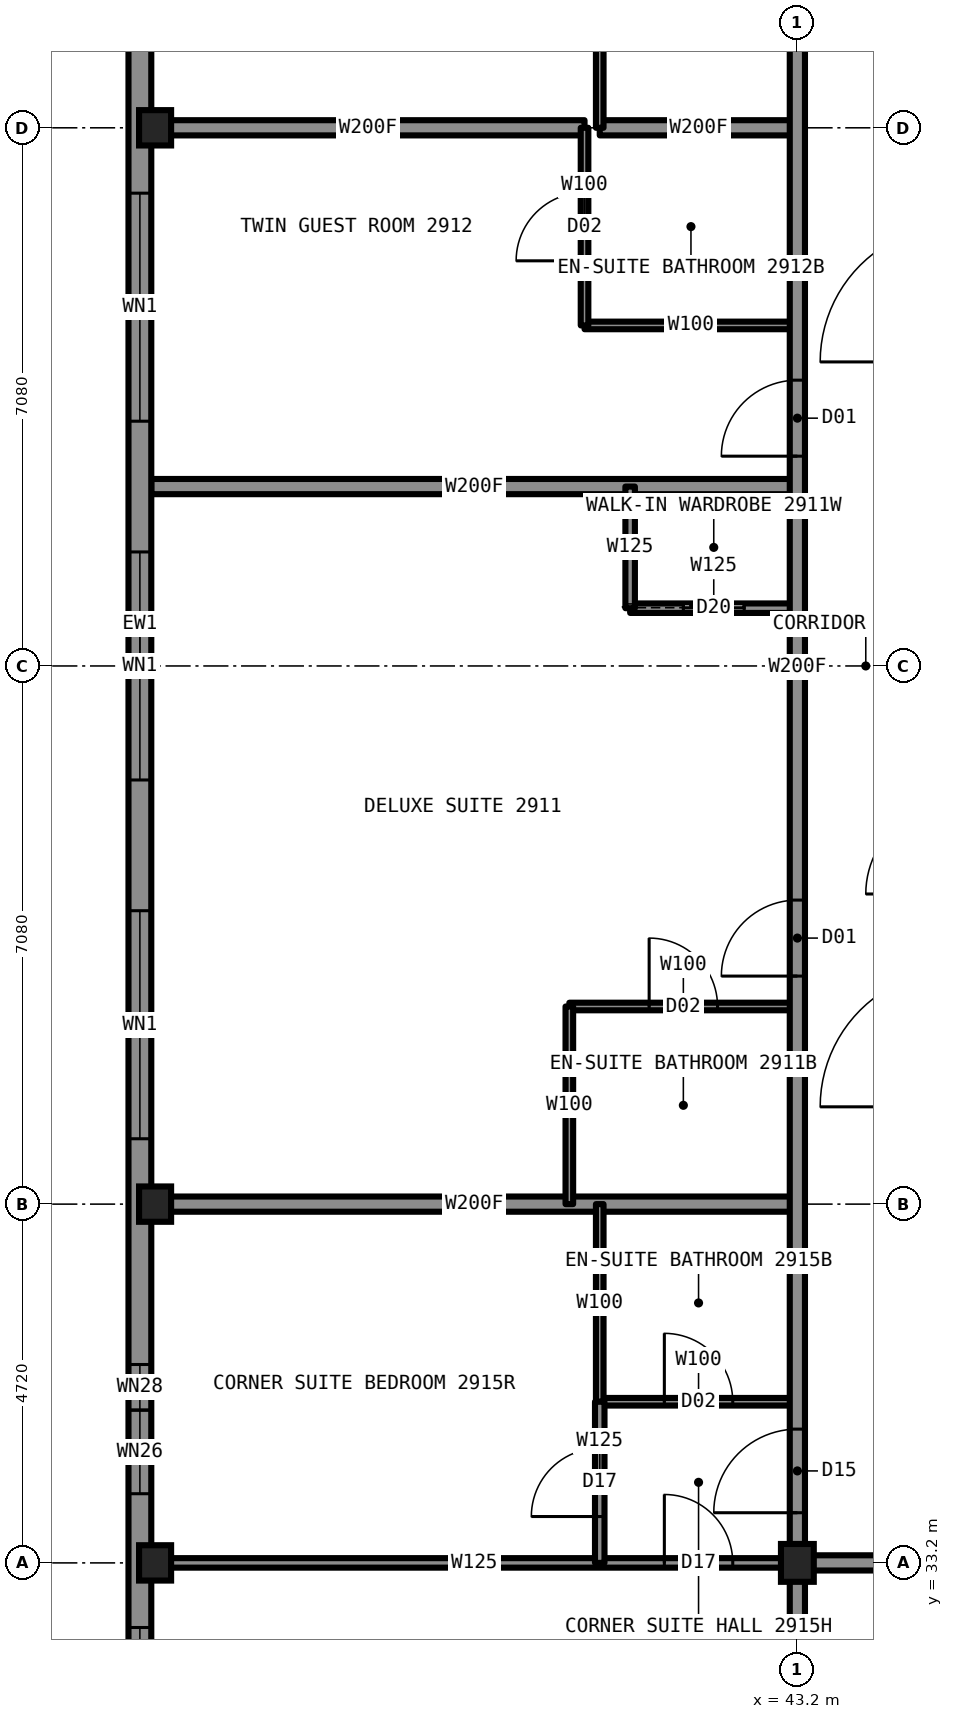
"""IFC4 building model, lengths in metres.
Left out: names, types, materials, properties, quantities, classifications, styles, units other than length and angle.
Written with IfcOpenShell. Run it as: python <this file> out.ifc"""

import sys

from ifc_helpers import new_model, si_unit, direction, frame, frame_2d, origin, origin_2d, place, context, subcontext, project, spatial, rectangle, i_section, extrude, element, fill, save


model = new_model("IFC4")
c1 = context("Model", 3, precision=1e-05, world=origin(), true_north=direction((0.0, 1.0)))
c2 = subcontext(c1, "Body", "Model", "MODEL_VIEW")
j1 = project(units=[si_unit("LENGTHUNIT", "METRE"), si_unit("PLANEANGLEUNIT", "RADIAN")], contexts=[c1])
p1 = place(None, origin())
s1 = spatial("IfcSite", under=j1, at=p1, CompositionType="ELEMENT")
p2 = place(p1, origin())
s2 = spatial("IfcBuilding", under=s1, at=p2, CompositionType="ELEMENT")
p3 = place(p2, frame((0.0, 0.0, 103.9)))
s3 = spatial("IfcBuildingStorey", under=s2, at=p3, CompositionType="ELEMENT", Elevation=103.9)
for number, where, z_axis, x_axis in (
    (1, (34.75, 33.2, 0.0), (0.0, 0.0, 1.0), (1.0, 0.0, 0.0)),
    (2, (34.75, 37.92, 0.0), (0.0, 0.0, 1.0), (1.0, 0.0, 0.0)),
    (3, (34.75, 52.08, 0.0), (0.0, 0.0, 1.0), (1.0, 0.0, 0.0)),
):
    element("IfcColumn", number, at=place(p3, frame(where, z_axis=z_axis, x_axis=x_axis)), inside=s3, PredefinedType="COLUMN", context=c2, shape_type="SweptSolid", body=[
        extrude(i_section(OverallWidth=0.422, OverallDepth=0.465, WebThickness=0.045, FlangeThickness=0.073, at=origin_2d()), origin(), (0.0, 0.0, 1.0), 3.5),
    ])
p4 = place(p3, frame((43.2, 33.2, 0.0), z_axis=(0.0, 0.0, 1.0), x_axis=(1.0, 0.0, 0.0)))
e4 = element("IfcColumn", 4, at=p4, inside=s3, PredefinedType="COLUMN", context=c2, shape_type="SweptSolid", body=[
    extrude(i_section(OverallWidth=0.432, OverallDepth=0.498, WebThickness=0.056, FlangeThickness=0.089, at=origin_2d()), origin(), (0.0, 0.0, 1.0), 3.5),
])
p5 = place(p3, frame((43.2, 33.2, 0.0), z_axis=(0.0, 0.0, 1.0), x_axis=(1.0, 0.0, 0.0)))
e5 = element("IfcWall", 5, at=p5, inside=s3, PredefinedType="PARTITIONING", context=c2, shape_type="SweptSolid", body=[
    extrude(rectangle(XDim=23.6, YDim=0.2, at=frame_2d((11.8, 0.0))), origin(), (0.0, 0.0, 1.0), 3.33),
])
p6 = place(p5, frame((3.0, 0.0, 0.0)))
e6 = element("IfcOpeningElement", 6, at=p6, cuts=e5, PredefinedType="OPENING", context=c2, shape_type="SweptSolid", body=[
    extrude(rectangle(XDim=1.0, YDim=2.2, at=frame_2d((0.5, 1.1))), frame((0.0, 0.11, 0.0), z_axis=(0.0, -1.0, 0.0), x_axis=(1.0, 0.0, 0.0)), (0.0, 0.0, 1.0), 0.22),
])
p7 = place(p5, frame((12.44, 0.0, 0.0)))
e7 = element("IfcOpeningElement", 7, at=p7, cuts=e5, PredefinedType="OPENING", context=c2, shape_type="SweptSolid", body=[
    extrude(rectangle(XDim=1.0, YDim=2.2, at=frame_2d((0.5, 1.1))), frame((0.0, 0.11, 0.0), z_axis=(0.0, -1.0, 0.0), x_axis=(1.0, 0.0, 0.0)), (0.0, 0.0, 1.0), 0.22),
])
p8 = place(p5, frame((21.43, 0.0, 0.0)))
e8 = element("IfcOpeningElement", 8, at=p8, cuts=e5, PredefinedType="OPENING", context=c2, shape_type="SweptSolid", body=[
    extrude(rectangle(XDim=1.0, YDim=2.2, at=frame_2d((0.5, 1.1))), frame((0.0, 0.11, 0.0), z_axis=(0.0, -1.0, 0.0), x_axis=(1.0, 0.0, 0.0)), (0.0, 0.0, 1.0), 0.22),
])
p9 = place(p3, frame((34.7, 33.2, 0.0), z_axis=(0.0, 0.0, 1.0), x_axis=(1.0, 0.0, 0.0)))
e9 = element("IfcWall", 9, at=p9, inside=s3, PredefinedType="PARTITIONING", context=c2, shape_type="SweptSolid", body=[
    extrude(rectangle(XDim=8.5, YDim=0.125, at=frame_2d((4.25, 0.0))), origin(), (0.0, 0.0, 1.0), 2.573),
])
p10 = place(p9, frame((6.75, 0.0, 0.0)))
e10 = element("IfcOpeningElement", 10, at=p10, cuts=e9, PredefinedType="OPENING", context=c2, shape_type="SweptSolid", body=[
    extrude(rectangle(XDim=0.9, YDim=2.2, at=frame_2d((0.45, 1.1))), frame((0.0, 0.073, 0.0), z_axis=(0.0, -1.0, 0.0), x_axis=(1.0, 0.0, 0.0)), (0.0, 0.0, 1.0), 0.145),
])
p11 = place(p3, frame((40.2, 40.52, 0.0), z_axis=(0.0, 0.0, 1.0), x_axis=(1.0, 0.0, 0.0)))
e11 = element("IfcWall", 11, at=p11, inside=s3, PredefinedType="PARTITIONING", context=c2, shape_type="SweptSolid", body=[
    extrude(rectangle(XDim=3.0, YDim=0.1, at=frame_2d((1.5, 0.0))), origin(), (0.0, 0.0, 1.0), 3.33),
])
p12 = place(p11, frame((1.05, 0.0, 0.0)))
e12 = element("IfcOpeningElement", 12, at=p12, cuts=e11, PredefinedType="OPENING", context=c2, shape_type="SweptSolid", body=[
    extrude(rectangle(XDim=0.9, YDim=2.1, at=frame_2d((0.45, 1.05))), frame((0.0, 0.06, 0.0), z_axis=(0.0, -1.0, 0.0), x_axis=(1.0, 0.0, 0.0)), (0.0, 0.0, 1.0), 0.12),
])
p13 = place(p3, frame((34.7, 37.92, 0.0), z_axis=(0.0, 0.0, 1.0), x_axis=(1.0, 0.0, 0.0)))
e13 = element("IfcWall", 13, at=p13, inside=s3, PredefinedType="PARTITIONING", context=c2, shape_type="SweptSolid", body=[
    extrude(rectangle(XDim=8.5, YDim=0.2, at=frame_2d((4.25, 0.0))), origin(), (0.0, 0.0, 1.0), 2.573),
])
p14 = place(p3, frame((40.6, 35.32, 0.0), z_axis=(0.0, 0.0, 1.0), x_axis=(1.0, 0.0, 0.0)))
e14 = element("IfcWall", 14, at=p14, inside=s3, PredefinedType="PARTITIONING", context=c2, shape_type="SweptSolid", body=[
    extrude(rectangle(XDim=2.6, YDim=0.1, at=frame_2d((1.3, 0.0))), origin(), (0.0, 0.0, 1.0), 3.33),
])
p15 = place(p14, frame((0.85, 0.0, 0.0)))
e15 = element("IfcOpeningElement", 15, at=p15, cuts=e14, PredefinedType="OPENING", context=c2, shape_type="SweptSolid", body=[
    extrude(rectangle(XDim=0.9, YDim=2.1, at=frame_2d((0.45, 1.05))), frame((0.0, 0.06, 0.0), z_axis=(0.0, -1.0, 0.0), x_axis=(1.0, 0.0, 0.0)), (0.0, 0.0, 1.0), 0.12),
])
p16 = place(p3, frame((41.0, 45.76, 0.0), z_axis=(0.0, 0.0, 1.0), x_axis=(1.0, 0.0, 0.0)))
e16 = element("IfcWall", 16, at=p16, inside=s3, PredefinedType="PARTITIONING", context=c2, shape_type="SweptSolid", body=[
    extrude(rectangle(XDim=2.2, YDim=0.125, at=frame_2d((1.1, 0.0))), origin(), (0.0, 0.0, 1.0), 3.33),
])
p17 = place(p16, frame((0.7, 0.0, 0.0)))
e17 = element("IfcOpeningElement", 17, at=p17, cuts=e16, PredefinedType="OPENING", context=c2, shape_type="SweptSolid", body=[
    extrude(rectangle(XDim=0.8, YDim=2.1, at=frame_2d((0.4, 1.05))), frame((0.0, 0.073, 0.0), z_axis=(0.0, -1.0, 0.0), x_axis=(1.0, 0.0, 0.0)), (0.0, 0.0, 1.0), 0.145),
])
p18 = place(p3, frame((34.7, 47.36, 0.0), z_axis=(0.0, 0.0, 1.0), x_axis=(1.0, 0.0, 0.0)))
e18 = element("IfcWall", 18, at=p18, inside=s3, PredefinedType="PARTITIONING", context=c2, shape_type="SweptSolid", body=[
    extrude(rectangle(XDim=8.5, YDim=0.2, at=frame_2d((4.25, 0.0))), origin(), (0.0, 0.0, 1.0), 2.731),
])
p19 = place(p3, frame((40.4, 49.48, 0.0), z_axis=(0.0, 0.0, 1.0), x_axis=(1.0, 0.0, 0.0)))
e19 = element("IfcWall", 19, at=p19, inside=s3, PredefinedType="PARTITIONING", context=c2, shape_type="SweptSolid", body=[
    extrude(rectangle(XDim=2.8, YDim=0.1, at=frame_2d((1.4, 0.0))), origin(), (0.0, 0.0, 1.0), 3.33),
])
p20 = place(p3, frame((34.7, 52.08, 0.0), z_axis=(0.0, 0.0, 1.0), x_axis=(1.0, 0.0, 0.0)))
e20 = element("IfcWall", 20, at=p20, inside=s3, PredefinedType="PARTITIONING", context=c2, shape_type="SweptSolid", body=[
    extrude(rectangle(XDim=5.7, YDim=0.2, at=frame_2d((2.85, 0.0))), origin(), (0.0, 0.0, 1.0), 2.573),
])
p21 = place(p3, frame((40.6, 52.08, 0.0), z_axis=(0.0, 0.0, 1.0), x_axis=(1.0, 0.0, 0.0)))
e21 = element("IfcWall", 21, at=p21, inside=s3, PredefinedType="PARTITIONING", context=c2, shape_type="SweptSolid", body=[
    extrude(rectangle(XDim=2.6, YDim=0.2, at=frame_2d((1.3, 0.0))), origin(), (0.0, 0.0, 1.0), 2.573),
])
p22 = place(p3, frame((43.2, 33.2, 0.0), z_axis=(0.0, 0.0, 1.0), x_axis=(0.0, 1.0, 0.0)))
e22 = element("IfcWall", 22, at=p22, inside=s3, PredefinedType="PARTITIONING", context=c2, shape_type="SweptSolid", body=[
    extrude(rectangle(XDim=23.58, YDim=0.2, at=frame_2d((11.79, 0.0))), origin(), (0.0, 0.0, 1.0), 3.33),
])
p23 = place(p22, frame((7.72, 0.0, 0.0)))
e23 = element("IfcOpeningElement", 23, at=p23, cuts=e22, PredefinedType="OPENING", context=c2, shape_type="SweptSolid", body=[
    extrude(rectangle(XDim=1.0, YDim=2.2, at=frame_2d((0.5, 1.1))), frame((0.0, 0.11, 0.0), z_axis=(0.0, -1.0, 0.0), x_axis=(1.0, 0.0, 0.0)), (0.0, 0.0, 1.0), 0.22),
])
p24 = place(p22, frame((14.56, 0.0, 0.0)))
e24 = element("IfcOpeningElement", 24, at=p24, cuts=e22, PredefinedType="OPENING", context=c2, shape_type="SweptSolid", body=[
    extrude(rectangle(XDim=1.0, YDim=2.2, at=frame_2d((0.5, 1.1))), frame((0.0, 0.11, 0.0), z_axis=(0.0, -1.0, 0.0), x_axis=(1.0, 0.0, 0.0)), (0.0, 0.0, 1.0), 0.22),
])
p25 = place(p22, frame((21.84, 0.0, 0.0)))
e25 = element("IfcOpeningElement", 25, at=p25, cuts=e22, PredefinedType="OPENING", context=c2, shape_type="SweptSolid", body=[
    extrude(rectangle(XDim=1.1, YDim=2.2, at=frame_2d((0.55, 1.1))), frame((0.0, 0.11, 0.0), z_axis=(0.0, -1.0, 0.0), x_axis=(1.0, 0.0, 0.0)), (0.0, 0.0, 1.0), 0.22),
])
p26 = place(p22, frame((0.66, 0.0, 0.0)))
e26 = element("IfcOpeningElement", 26, at=p26, cuts=e22, PredefinedType="OPENING", context=c2, shape_type="SweptSolid", body=[
    extrude(rectangle(XDim=1.1, YDim=2.2, at=frame_2d((0.55, 1.1))), frame((0.0, 0.11, 0.0), z_axis=(0.0, -1.0, 0.0), x_axis=(1.0, 0.0, 0.0)), (0.0, 0.0, 1.0), 0.22),
])
p27 = place(p3, frame((43.2, 24.7, 0.0), z_axis=(0.0, 0.0, 1.0), x_axis=(0.0, 1.0, 0.0)))
e27 = element("IfcWall", 27, at=p27, inside=s3, PredefinedType="PARTITIONING", context=c2, shape_type="SweptSolid", body=[
    extrude(rectangle(XDim=8.5, YDim=0.2, at=frame_2d((4.25, 0.0))), origin(), (0.0, 0.0, 1.0), 2.573),
])
p28 = place(p3, frame((41.0, 45.76, 0.0), z_axis=(0.0, 0.0, 1.0), x_axis=(0.0, 1.0, 0.0)))
e28 = element("IfcWall", 28, at=p28, inside=s3, PredefinedType="PARTITIONING", context=c2, shape_type="SweptSolid", body=[
    extrude(rectangle(XDim=1.6, YDim=0.125, at=frame_2d((0.8, 0.0))), origin(), (0.0, 0.0, 1.0), 3.33),
])
for number, where, z_axis, x_axis in (
    (29, (40.6, 35.32, 0.0), (0.0, 0.0, 1.0), (0.0, 1.0, 0.0)),
    (30, (40.6, 52.08, 0.0), (0.0, 0.0, 1.0), (0.0, 1.0, 0.0)),
):
    element("IfcWall", number, at=place(p3, frame(where, z_axis=z_axis, x_axis=x_axis)), inside=s3, PredefinedType="PARTITIONING", context=c2, shape_type="SweptSolid", body=[
        extrude(rectangle(XDim=2.6, YDim=0.1, at=frame_2d((1.3, 0.0))), origin(), (0.0, 0.0, 1.0), 3.33),
    ])
p29 = place(p3, frame((40.6, 33.2, 0.0), z_axis=(0.0, 0.0, 1.0), x_axis=(0.0, 1.0, 0.0)))
e31 = element("IfcWall", 31, at=p29, inside=s3, PredefinedType="PARTITIONING", context=c2, shape_type="SweptSolid", body=[
    extrude(rectangle(XDim=2.12, YDim=0.125, at=frame_2d((1.06, 0.0))), origin(), (0.0, 0.0, 1.0), 3.33),
])
p30 = place(p29, frame((0.61, 0.0, 0.0)))
e32 = element("IfcOpeningElement", 32, at=p30, cuts=e31, PredefinedType="OPENING", context=c2, shape_type="SweptSolid", body=[
    extrude(rectangle(XDim=0.9, YDim=2.2, at=frame_2d((0.45, 1.1))), frame((0.0, 0.073, 0.0), z_axis=(0.0, -1.0, 0.0), x_axis=(1.0, 0.0, 0.0)), (0.0, 0.0, 1.0), 0.145),
])
p31 = place(p3, frame((40.4, 49.48, 0.0), z_axis=(0.0, 0.0, 1.0), x_axis=(0.0, 1.0, 0.0)))
e33 = element("IfcWall", 33, at=p31, inside=s3, PredefinedType="PARTITIONING", context=c2, shape_type="SweptSolid", body=[
    extrude(rectangle(XDim=2.6, YDim=0.1, at=frame_2d((1.3, 0.0))), origin(), (0.0, 0.0, 1.0), 3.33),
])
p32 = place(p31, frame((0.85, 0.0, 0.0)))
e34 = element("IfcOpeningElement", 34, at=p32, cuts=e33, PredefinedType="OPENING", context=c2, shape_type="SweptSolid", body=[
    extrude(rectangle(XDim=0.9, YDim=2.1, at=frame_2d((0.45, 1.05))), frame((0.0, 0.06, 0.0), z_axis=(0.0, -1.0, 0.0), x_axis=(1.0, 0.0, 0.0)), (0.0, 0.0, 1.0), 0.12),
])
p33 = place(p3, frame((40.2, 37.92, 0.0), z_axis=(0.0, 0.0, 1.0), x_axis=(0.0, 1.0, 0.0)))
e35 = element("IfcWall", 35, at=p33, inside=s3, PredefinedType="PARTITIONING", context=c2, shape_type="SweptSolid", body=[
    extrude(rectangle(XDim=2.6, YDim=0.1, at=frame_2d((1.3, 0.0))), origin(), (0.0, 0.0, 1.0), 3.33),
])
p34 = place(p3, frame((34.55, 60.1, 0.0), z_axis=(0.0, 0.0, 1.0), x_axis=(0.0, -1.0, 0.0)))
e36 = element("IfcWall", 36, at=p34, inside=s3, PredefinedType="SOLIDWALL", context=c2, shape_type="SweptSolid", body=[
    extrude(rectangle(XDim=30.2, YDim=0.3, at=frame_2d((15.1, 0.0))), origin(), (0.0, 0.0, 1.0), 2.83),
])
p35 = place(p34, frame((4.16, 0.0, 0.5)))
e37 = element("IfcOpeningElement", 37, at=p35, cuts=e36, PredefinedType="OPENING", context=c2, shape_type="SweptSolid", body=[
    extrude(rectangle(XDim=3.0, YDim=2.0, at=frame_2d((1.5, 1.0))), frame((0.0, 0.16, 0.0), z_axis=(0.0, -1.0, 0.0), x_axis=(1.0, 0.0, 0.0)), (0.0, 0.0, 1.0), 0.32),
])
p36 = place(p34, frame((8.88, 0.0, 0.5)))
e38 = element("IfcOpeningElement", 38, at=p36, cuts=e36, PredefinedType="OPENING", context=c2, shape_type="SweptSolid", body=[
    extrude(rectangle(XDim=3.0, YDim=2.0, at=frame_2d((1.5, 1.0))), frame((0.0, 0.16, 0.0), z_axis=(0.0, -1.0, 0.0), x_axis=(1.0, 0.0, 0.0)), (0.0, 0.0, 1.0), 0.32),
])
p37 = place(p34, frame((13.6, 0.0, 0.5)))
e39 = element("IfcOpeningElement", 39, at=p37, cuts=e36, PredefinedType="OPENING", context=c2, shape_type="SweptSolid", body=[
    extrude(rectangle(XDim=3.0, YDim=2.0, at=frame_2d((1.5, 1.0))), frame((0.0, 0.16, 0.0), z_axis=(0.0, -1.0, 0.0), x_axis=(1.0, 0.0, 0.0)), (0.0, 0.0, 1.0), 0.32),
])
p38 = place(p34, frame((18.32, 0.0, 0.5)))
e40 = element("IfcOpeningElement", 40, at=p38, cuts=e36, PredefinedType="OPENING", context=c2, shape_type="SweptSolid", body=[
    extrude(rectangle(XDim=3.0, YDim=2.0, at=frame_2d((1.5, 1.0))), frame((0.0, 0.16, 0.0), z_axis=(0.0, -1.0, 0.0), x_axis=(1.0, 0.0, 0.0)), (0.0, 0.0, 1.0), 0.32),
])
p39 = place(p34, frame((23.04, 0.0, 0.5)))
e41 = element("IfcOpeningElement", 41, at=p39, cuts=e36, PredefinedType="OPENING", context=c2, shape_type="SweptSolid", body=[
    extrude(rectangle(XDim=3.0, YDim=2.0, at=frame_2d((1.5, 1.0))), frame((0.0, 0.16, 0.0), z_axis=(0.0, -1.0, 0.0), x_axis=(1.0, 0.0, 0.0)), (0.0, 0.0, 1.0), 0.32),
])
p40 = place(p23, origin())
e42 = element("IfcDoor", 42, at=p40, inside=s3, OperationType="SINGLE_SWING_LEFT", PredefinedType="DOOR", context=c2, shape_type="SweptSolid", body=[
    extrude(rectangle(XDim=1.0, YDim=2.2, at=frame_2d((0.5, 1.1))), frame((0.0, 0.025, 0.0), z_axis=(0.0, -1.0, 0.0), x_axis=(1.0, 0.0, 0.0)), (0.0, 0.0, 1.0), 0.05),
])
fill(e23, e42)
p41 = place(p12, origin())
e43 = element("IfcDoor", 43, at=p41, inside=s3, OperationType="SINGLE_SWING_RIGHT", PredefinedType="DOOR", context=c2, shape_type="SweptSolid", body=[
    extrude(rectangle(XDim=0.9, YDim=2.1, at=frame_2d((0.45, 1.05))), frame((0.0, 0.025, 0.0), z_axis=(0.0, -1.0, 0.0), x_axis=(1.0, 0.0, 0.0)), (0.0, 0.0, 1.0), 0.05),
])
fill(e12, e43)
p42 = place(p17, origin())
e44 = element("IfcDoor", 44, at=p42, inside=s3, OperationType="SLIDING_TO_LEFT", PredefinedType="DOOR", context=c2, shape_type="SweptSolid", body=[
    extrude(rectangle(XDim=0.8, YDim=2.1, at=frame_2d((0.4, 1.05))), frame((0.0, 0.025, 0.0), z_axis=(0.0, -1.0, 0.0), x_axis=(1.0, 0.0, 0.0)), (0.0, 0.0, 1.0), 0.05),
])
fill(e17, e44)
p43 = place(p24, origin())
e45 = element("IfcDoor", 45, at=p43, inside=s3, OperationType="SINGLE_SWING_LEFT", PredefinedType="DOOR", context=c2, shape_type="SweptSolid", body=[
    extrude(rectangle(XDim=1.0, YDim=2.2, at=frame_2d((0.5, 1.1))), frame((0.0, 0.025, 0.0), z_axis=(0.0, -1.0, 0.0), x_axis=(1.0, 0.0, 0.0)), (0.0, 0.0, 1.0), 0.05),
])
fill(e24, e45)
p44 = place(p32, origin())
e46 = element("IfcDoor", 46, at=p44, inside=s3, OperationType="SINGLE_SWING_RIGHT", PredefinedType="DOOR", context=c2, shape_type="SweptSolid", body=[
    extrude(rectangle(XDim=0.9, YDim=2.1, at=frame_2d((0.45, 1.05))), frame((0.0, 0.025, 0.0), z_axis=(0.0, -1.0, 0.0), x_axis=(1.0, 0.0, 0.0)), (0.0, 0.0, 1.0), 0.05),
])
fill(e34, e46)
p45 = place(p10, origin())
e47 = element("IfcDoor", 47, at=p45, inside=s3, OperationType="SINGLE_SWING_LEFT", PredefinedType="DOOR", context=c2, shape_type="SweptSolid", body=[
    extrude(rectangle(XDim=0.9, YDim=2.2, at=frame_2d((0.45, 1.1))), frame((0.0, 0.025, 0.0), z_axis=(0.0, -1.0, 0.0), x_axis=(1.0, 0.0, 0.0)), (0.0, 0.0, 1.0), 0.05),
])
fill(e10, e47)
p46 = place(p15, origin())
e48 = element("IfcDoor", 48, at=p46, inside=s3, OperationType="SINGLE_SWING_RIGHT", PredefinedType="DOOR", context=c2, shape_type="SweptSolid", body=[
    extrude(rectangle(XDim=0.9, YDim=2.1, at=frame_2d((0.45, 1.05))), frame((0.0, 0.025, 0.0), z_axis=(0.0, -1.0, 0.0), x_axis=(1.0, 0.0, 0.0)), (0.0, 0.0, 1.0), 0.05),
])
fill(e15, e48)
p47 = place(p26, origin())
e49 = element("IfcDoor", 49, at=p47, inside=s3, OperationType="SINGLE_SWING_LEFT", PredefinedType="DOOR", context=c2, shape_type="SweptSolid", body=[
    extrude(rectangle(XDim=1.1, YDim=2.2, at=frame_2d((0.55, 1.1))), frame((0.0, 0.025, 0.0), z_axis=(0.0, -1.0, 0.0), x_axis=(1.0, 0.0, 0.0)), (0.0, 0.0, 1.0), 0.05),
])
fill(e26, e49)
p48 = place(p30, origin())
e50 = element("IfcDoor", 50, at=p48, inside=s3, OperationType="SINGLE_SWING_LEFT", PredefinedType="DOOR", context=c2, shape_type="SweptSolid", body=[
    extrude(rectangle(XDim=0.9, YDim=2.2, at=frame_2d((0.45, 1.1))), frame((0.0, 0.025, 0.0), z_axis=(0.0, -1.0, 0.0), x_axis=(1.0, 0.0, 0.0)), (0.0, 0.0, 1.0), 0.05),
])
fill(e32, e50)
p49 = place(p35, origin())
e51 = element("IfcWindow", 51, at=p49, inside=s3, PartitioningType="SINGLE_PANEL", PredefinedType="WINDOW", context=c2, shape_type="SweptSolid", body=[
    extrude(rectangle(XDim=3.0, YDim=2.0, at=frame_2d((1.5, 1.0))), frame((0.0, 0.03, 0.0), z_axis=(0.0, -1.0, 0.0), x_axis=(1.0, 0.0, 0.0)), (0.0, 0.0, 1.0), 0.06),
])
fill(e37, e51)
p50 = place(p36, origin())
e52 = element("IfcWindow", 52, at=p50, inside=s3, PartitioningType="SINGLE_PANEL", PredefinedType="WINDOW", context=c2, shape_type="SweptSolid", body=[
    extrude(rectangle(XDim=3.0, YDim=2.0, at=frame_2d((1.5, 1.0))), frame((0.0, 0.03, 0.0), z_axis=(0.0, -1.0, 0.0), x_axis=(1.0, 0.0, 0.0)), (0.0, 0.0, 1.0), 0.06),
])
fill(e38, e52)
p51 = place(p37, origin())
e53 = element("IfcWindow", 53, at=p51, inside=s3, PartitioningType="SINGLE_PANEL", PredefinedType="WINDOW", context=c2, shape_type="SweptSolid", body=[
    extrude(rectangle(XDim=3.0, YDim=2.0, at=frame_2d((1.5, 1.0))), frame((0.0, 0.03, 0.0), z_axis=(0.0, -1.0, 0.0), x_axis=(1.0, 0.0, 0.0)), (0.0, 0.0, 1.0), 0.06),
])
fill(e39, e53)
p52 = place(p38, origin())
e54 = element("IfcWindow", 54, at=p52, inside=s3, PartitioningType="SINGLE_PANEL", PredefinedType="WINDOW", context=c2, shape_type="SweptSolid", body=[
    extrude(rectangle(XDim=3.0, YDim=2.0, at=frame_2d((1.5, 1.0))), frame((0.0, 0.03, 0.0), z_axis=(0.0, -1.0, 0.0), x_axis=(1.0, 0.0, 0.0)), (0.0, 0.0, 1.0), 0.06),
])
fill(e40, e54)
p53 = place(p39, origin())
e55 = element("IfcWindow", 55, at=p53, inside=s3, PartitioningType="SINGLE_PANEL", PredefinedType="WINDOW", context=c2, shape_type="SweptSolid", body=[
    extrude(rectangle(XDim=3.0, YDim=2.0, at=frame_2d((1.5, 1.0))), frame((0.0, 0.03, 0.0), z_axis=(0.0, -1.0, 0.0), x_axis=(1.0, 0.0, 0.0)), (0.0, 0.0, 1.0), 0.06),
])
fill(e41, e55)
save(model, sys.argv[1])
